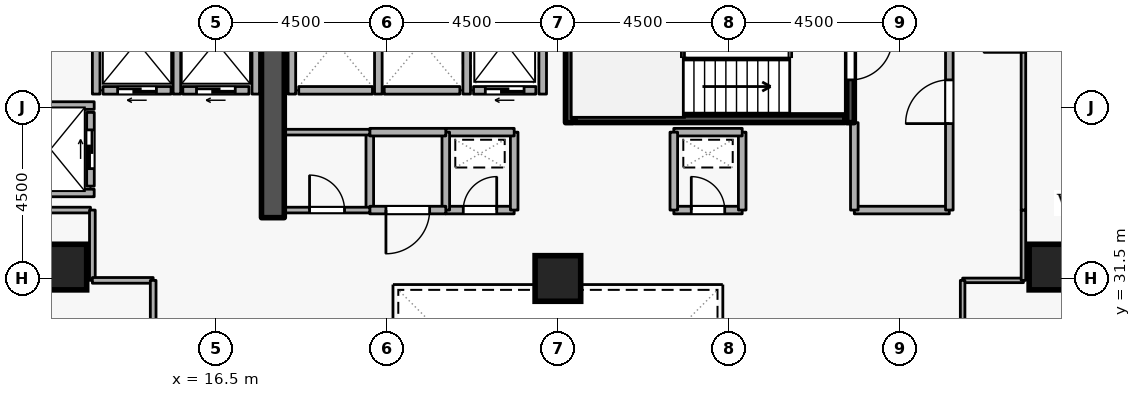
"""IFC4 building model, lengths in metres.
Left out: names, types, materials, properties, quantities, classifications, styles, units other than length and angle.
Written with IfcOpenShell. Run it as: python <this file> out.ifc"""

import sys

from ifc_helpers import new_model, si_unit, direction, frame, frame_2d, origin, origin_2d, place, context, subcontext, project, spatial, rectangle, extrude, element, fill, save


model = new_model("IFC4")
c1 = context("Model", 3, precision=1e-05, world=origin(), true_north=direction((0.0, 1.0)))
c2 = subcontext(c1, "Body", "Model", "MODEL_VIEW")
j1 = project(units=[si_unit("LENGTHUNIT", "METRE"), si_unit("PLANEANGLEUNIT", "RADIAN")], contexts=[c1])
p1 = place(None, origin())
s1 = spatial("IfcSite", under=j1, at=p1, CompositionType="ELEMENT")
p2 = place(p1, origin())
s2 = spatial("IfcBuilding", under=s1, at=p2, CompositionType="ELEMENT")
p3 = place(p2, frame((0.0, 0.0, 83.7)))
s3 = spatial("IfcBuildingStorey", under=s2, at=p3, CompositionType="ELEMENT", Elevation=83.7)
p4 = place(p3, frame((18.0, 33.1, 0.0), z_axis=(0.0, 0.0, 1.0), x_axis=(0.0, 1.0, 0.0)))
e1 = element("IfcWall", 1, at=p4, inside=s3, PredefinedType="SHEAR", context=c2, shape_type="SweptSolid", body=[
    extrude(rectangle(XDim=5.7, YDim=0.6, at=frame_2d((2.85, 0.0))), origin(), (0.0, 0.0, 1.0), 3.6),
])
for number, where, z_axis, x_axis in (
    (2, (12.5, 31.8, 0.0), (0.0, 0.0, 1.0), (1.0, 0.0, 0.0)),
    (3, (38.5, 31.8, 0.0), (0.0, 0.0, 1.0), (1.0, 0.0, 0.0)),
    (4, (25.5, 31.5, 0.0), (0.0, 0.0, 1.0), (1.0, 0.0, 0.0)),
):
    element("IfcColumn", number, at=place(p3, frame(where, z_axis=z_axis, x_axis=x_axis)), inside=s3, PredefinedType="COLUMN", context=c2, shape_type="SweptSolid", body=[
        extrude(rectangle(XDim=1.2, YDim=1.2, at=origin_2d()), origin(), (0.0, 0.0, 1.0), 3.6),
    ])
p5 = place(p3, frame((24.92, 36.45, 0.0), z_axis=(0.0, 0.0, 1.0), x_axis=(-1.0, 0.0, 0.0)))
e5 = element("IfcWall", 5, at=p5, inside=s3, PredefinedType="STANDARD", context=c2, shape_type="SweptSolid", body=[
    extrude(rectangle(XDim=1.64, YDim=0.2, at=frame_2d((0.82, 0.0))), origin(), (0.0, 0.0, 1.0), 3.34),
])
p6 = place(p5, frame((0.31, 0.0, 0.0)))
e6 = element("IfcOpeningElement", 6, at=p6, cuts=e5, PredefinedType="OPENING", context=c2, shape_type="SweptSolid", body=[
    extrude(rectangle(XDim=1.02, YDim=2.06, at=frame_2d((0.51, 1.03))), frame((0.0, 0.11, 0.0), z_axis=(0.0, -1.0, 0.0), x_axis=(1.0, 0.0, 0.0)), (0.0, 0.0, 1.0), 0.22),
])
p7 = place(p3, frame((22.92, 36.45, 0.0), z_axis=(0.0, 0.0, 1.0), x_axis=(-1.0, 0.0, 0.0)))
e7 = element("IfcWall", 7, at=p7, inside=s3, PredefinedType="STANDARD", context=c2, shape_type="SweptSolid", body=[
    extrude(rectangle(XDim=1.99, YDim=0.2, at=frame_2d((0.995, 0.0))), origin(), (0.0, 0.0, 1.0), 3.34),
])
p8 = place(p3, frame((20.62, 36.45, 0.0), z_axis=(0.0, 0.0, 1.0), x_axis=(-1.0, 0.0, 0.0)))
e8 = element("IfcWall", 8, at=p8, inside=s3, PredefinedType="STANDARD", context=c2, shape_type="SweptSolid", body=[
    extrude(rectangle(XDim=1.94, YDim=0.2, at=frame_2d((0.97, 0.0))), origin(), (0.0, 0.0, 1.0), 3.34),
])
p9 = place(p3, frame((17.37, 36.45, 0.0), z_axis=(0.0, 0.0, 1.0), x_axis=(-1.0, 0.0, 0.0)))
e9 = element("IfcWall", 9, at=p9, inside=s3, PredefinedType="STANDARD", context=c2, shape_type="SweptSolid", body=[
    extrude(rectangle(XDim=1.74, YDim=0.2, at=frame_2d((0.87, 0.0))), origin(), (0.0, 0.0, 1.0), 3.34),
])
p10 = place(p9, frame((0.36, 0.0, 0.0)))
e10 = element("IfcOpeningElement", 10, at=p10, cuts=e9, PredefinedType="OPENING", context=c2, shape_type="SweptSolid", body=[
    extrude(rectangle(XDim=1.02, YDim=2.06, at=frame_2d((0.51, 1.03))), frame((0.0, 0.11, 0.0), z_axis=(0.0, -1.0, 0.0), x_axis=(1.0, 0.0, 0.0)), (0.0, 0.0, 1.0), 0.22),
])
p11 = place(p3, frame((15.32, 36.45, 0.0), z_axis=(0.0, 0.0, 1.0), x_axis=(-1.0, 0.0, 0.0)))
e11 = element("IfcWall", 11, at=p11, inside=s3, PredefinedType="STANDARD", context=c2, shape_type="SweptSolid", body=[
    extrude(rectangle(XDim=1.79, YDim=0.2, at=frame_2d((0.895, 0.0))), origin(), (0.0, 0.0, 1.0), 3.34),
])
p12 = place(p11, frame((0.385, 0.0, 0.0)))
e12 = element("IfcOpeningElement", 12, at=p12, cuts=e11, PredefinedType="OPENING", context=c2, shape_type="SweptSolid", body=[
    extrude(rectangle(XDim=1.02, YDim=2.06, at=frame_2d((0.51, 1.03))), frame((0.0, 0.11, 0.0), z_axis=(0.0, -1.0, 0.0), x_axis=(1.0, 0.0, 0.0)), (0.0, 0.0, 1.0), 0.22),
])
p13 = place(p3, frame((13.2, 33.93, 0.0), z_axis=(0.0, 0.0, 1.0), x_axis=(0.0, 1.0, 0.0)))
e13 = element("IfcWall", 13, at=p13, inside=s3, PredefinedType="STANDARD", context=c2, shape_type="SweptSolid", body=[
    extrude(rectangle(XDim=1.94, YDim=0.2, at=frame_2d((0.97, 0.0))), origin(), (0.0, 0.0, 1.0), 3.34),
])
p14 = place(p13, frame((0.46, 0.0, 0.0)))
e14 = element("IfcOpeningElement", 14, at=p14, cuts=e13, PredefinedType="OPENING", context=c2, shape_type="SweptSolid", body=[
    extrude(rectangle(XDim=1.02, YDim=2.06, at=frame_2d((0.51, 1.03))), frame((0.0, 0.11, 0.0), z_axis=(0.0, -1.0, 0.0), x_axis=(1.0, 0.0, 0.0)), (0.0, 0.0, 1.0), 0.22),
])
for number, where, z_axis, x_axis in (
    (15, (25.1, 36.352, 0.0), (0.0, 0.0, 1.0), (0.0, 1.0, 0.0)),
    (16, (23.1, 36.352, 0.0), (0.0, 0.0, 1.0), (0.0, 1.0, 0.0)),
    (17, (20.775, 36.352, 0.0), (0.0, 0.0, 1.0), (0.0, 1.0, 0.0)),
    (18, (18.5, 36.352, 0.0), (0.0, 0.0, 1.0), (0.0, 1.0, 0.0)),
):
    element("IfcWall", number, at=place(p3, frame(where, z_axis=z_axis, x_axis=x_axis)), inside=s3, PredefinedType="STANDARD", context=c2, shape_type="SweptSolid", body=[
        extrude(rectangle(XDim=2.436, YDim=0.2, at=frame_2d((1.218, 0.0))), origin(), (0.0, 0.0, 1.0), 3.34),
    ])
p15 = place(p3, frame((17.55, 36.352, 0.0), z_axis=(0.0, 0.0, 1.0), x_axis=(0.0, 1.0, 0.0)))
e19 = element("IfcWall", 19, at=p15, inside=s3, PredefinedType="STANDARD", context=c2, shape_type="SweptSolid", body=[
    extrude(rectangle(XDim=2.636, YDim=0.2, at=frame_2d((1.318, 0.0))), origin(), (0.0, 0.0, 1.0), 2.545),
])
for number, where, z_axis, x_axis in (
    (20, (15.475, 36.352, 0.0), (0.0, 0.0, 1.0), (0.0, 1.0, 0.0)),
    (21, (13.35, 36.352, 0.0), (0.0, 0.0, 1.0), (0.0, 1.0, 0.0)),
):
    element("IfcWall", number, at=place(p3, frame(where, z_axis=z_axis, x_axis=x_axis)), inside=s3, PredefinedType="STANDARD", context=c2, shape_type="SweptSolid", body=[
        extrude(rectangle(XDim=2.636, YDim=0.2, at=frame_2d((1.318, 0.0))), origin(), (0.0, 0.0, 1.0), 3.34),
    ])
for number, where, z_axis, x_axis in (
    (22, (11.002, 36.05, 0.0), (0.0, 0.0, 1.0), (1.0, 0.0, 0.0)),
    (23, (11.002, 33.75, 0.0), (0.0, 0.0, 1.0), (1.0, 0.0, 0.0)),
):
    element("IfcWall", number, at=place(p3, frame(where, z_axis=z_axis, x_axis=x_axis)), inside=s3, PredefinedType="STANDARD", context=c2, shape_type="SweptSolid", body=[
        extrude(rectangle(XDim=2.296, YDim=0.2, at=frame_2d((1.148, 0.0))), origin(), (0.0, 0.0, 1.0), 3.34),
    ])
p16 = place(p3, frame((33.2, 38.95, 0.0), z_axis=(0.0, 0.0, 1.0), x_axis=(0.0, -1.0, 0.0)))
e24 = element("IfcWall", 24, at=p16, inside=s3, PredefinedType="SHEAR", context=c2, shape_type="SweptSolid", body=[
    extrude(rectangle(XDim=3.35, YDim=0.2, at=frame_2d((1.675, 0.0))), origin(), (0.0, 0.0, 1.0), 3.6),
])
p17 = place(p16, frame((1.125, 0.0, 0.0)))
e25 = element("IfcOpeningElement", 25, at=p17, cuts=e24, PredefinedType="OPENING", context=c2, shape_type="SweptSolid", body=[
    extrude(rectangle(XDim=1.1, YDim=2.1, at=frame_2d((0.55, 1.05))), frame((0.0, 0.11, 0.0), z_axis=(0.0, -1.0, 0.0), x_axis=(1.0, 0.0, 0.0)), (0.0, 0.0, 1.0), 0.22),
])
p18 = place(p3, frame((25.8, 35.6, 0.0), z_axis=(0.0, 0.0, 1.0), x_axis=(0.0, 1.0, 0.0)))
e26 = element("IfcWall", 26, at=p18, inside=s3, PredefinedType="SHEAR", context=c2, shape_type="SweptSolid", body=[
    extrude(rectangle(XDim=3.35, YDim=0.2, at=frame_2d((1.675, 0.0))), origin(), (0.0, 0.0, 1.0), 3.6),
])
p19 = place(p3, frame((25.95, 35.703, 0.0), z_axis=(0.0, 0.0, 1.0), x_axis=(1.0, 0.0, 0.0)))
e27 = element("IfcWall", 27, at=p19, inside=s3, PredefinedType="SHEAR", context=c2, shape_type="SweptSolid", body=[
    extrude(rectangle(XDim=7.1, YDim=0.2, at=frame_2d((3.55, 0.0))), origin(), (0.0, 0.0, 1.0), 3.6),
])
p20 = place(p3, frame((33.3, 33.3, 0.0), z_axis=(0.0, 0.0, 1.0), x_axis=(1.0, 0.0, 0.0)))
e28 = element("IfcWall", 28, at=p20, inside=s3, PredefinedType="STANDARD", context=c2, shape_type="SweptSolid", body=[
    extrude(rectangle(XDim=2.5, YDim=0.2, at=frame_2d((1.25, 0.0))), origin(), (0.0, 0.0, 1.0), 3.34),
])
p21 = place(p3, frame((35.8, 33.3, 0.0), z_axis=(0.0, 0.0, 1.0), x_axis=(0.0, 1.0, 0.0)))
e29 = element("IfcWall", 29, at=p21, inside=s3, PredefinedType="STANDARD", context=c2, shape_type="SweptSolid", body=[
    extrude(rectangle(XDim=5.7, YDim=0.2, at=frame_2d((2.85, 0.0))), origin(), (0.0, 0.0, 1.0), 3.34),
])
p22 = place(p21, frame((2.275, 0.0, 0.0)))
e30 = element("IfcOpeningElement", 30, at=p22, cuts=e29, PredefinedType="OPENING", context=c2, shape_type="SweptSolid", body=[
    extrude(rectangle(XDim=1.15, YDim=2.1, at=frame_2d((0.575, 1.05))), frame((0.0, 0.11, 0.0), z_axis=(0.0, -1.0, 0.0), x_axis=(1.0, 0.0, 0.0)), (0.0, 0.0, 1.0), 0.22),
])
p23 = place(p3, frame((33.3, 35.6, 0.0), z_axis=(0.0, 0.0, 1.0), x_axis=(0.0, -1.0, 0.0)))
e31 = element("IfcWall", 31, at=p23, inside=s3, PredefinedType="STANDARD", context=c2, shape_type="SweptSolid", body=[
    extrude(rectangle(XDim=2.3, YDim=0.2, at=frame_2d((1.15, 0.0))), origin(), (0.0, 0.0, 1.0), 2.545),
])
p24 = place(p3, frame((22.55, 33.3, 0.0), z_axis=(0.0, 0.0, 1.0), x_axis=(1.0, 0.0, 0.0)))
e32 = element("IfcWall", 32, at=p24, inside=s3, PredefinedType="STANDARD", context=c2, shape_type="SweptSolid", body=[
    extrude(rectangle(XDim=1.8, YDim=0.2, at=frame_2d((0.9, 0.0))), origin(), (0.0, 0.0, 1.0), 3.34),
])
p25 = place(p24, frame((0.46, 0.0, 0.0)))
e33 = element("IfcOpeningElement", 33, at=p25, cuts=e32, PredefinedType="OPENING", context=c2, shape_type="SweptSolid", body=[
    extrude(rectangle(XDim=0.88, YDim=2.04, at=frame_2d((0.44, 1.02))), frame((0.0, 0.11, 0.0), z_axis=(0.0, -1.0, 0.0), x_axis=(1.0, 0.0, 0.0)), (0.0, 0.0, 1.0), 0.22),
])
p26 = place(p3, frame((24.35, 33.3, 0.0), z_axis=(0.0, 0.0, 1.0), x_axis=(0.0, 1.0, 0.0)))
e34 = element("IfcWall", 34, at=p26, inside=s3, PredefinedType="STANDARD", context=c2, shape_type="SweptSolid", body=[
    extrude(rectangle(XDim=2.05, YDim=0.2, at=frame_2d((1.025, 0.0))), origin(), (0.0, 0.0, 1.0), 3.34),
])
p27 = place(p3, frame((24.35, 35.35, 0.0), z_axis=(0.0, 0.0, 1.0), x_axis=(-1.0, 0.0, 0.0)))
e35 = element("IfcWall", 35, at=p27, inside=s3, PredefinedType="STANDARD", context=c2, shape_type="SweptSolid", body=[
    extrude(rectangle(XDim=1.8, YDim=0.2, at=frame_2d((0.9, 0.0))), origin(), (0.0, 0.0, 1.0), 3.34),
])
p28 = place(p3, frame((22.55, 35.35, 0.0), z_axis=(0.0, 0.0, 1.0), x_axis=(0.0, -1.0, 0.0)))
e36 = element("IfcWall", 36, at=p28, inside=s3, PredefinedType="STANDARD", context=c2, shape_type="SweptSolid", body=[
    extrude(rectangle(XDim=2.05, YDim=0.2, at=frame_2d((1.025, 0.0))), origin(), (0.0, 0.0, 1.0), 3.34),
])
p29 = place(p3, frame((28.55, 33.3, 0.0), z_axis=(0.0, 0.0, 1.0), x_axis=(1.0, 0.0, 0.0)))
e37 = element("IfcWall", 37, at=p29, inside=s3, PredefinedType="STANDARD", context=c2, shape_type="SweptSolid", body=[
    extrude(rectangle(XDim=1.8, YDim=0.2, at=frame_2d((0.9, 0.0))), origin(), (0.0, 0.0, 1.0), 3.34),
])
p30 = place(p29, frame((0.46, 0.0, 0.0)))
e38 = element("IfcOpeningElement", 38, at=p30, cuts=e37, PredefinedType="OPENING", context=c2, shape_type="SweptSolid", body=[
    extrude(rectangle(XDim=0.88, YDim=2.04, at=frame_2d((0.44, 1.02))), frame((0.0, 0.11, 0.0), z_axis=(0.0, -1.0, 0.0), x_axis=(1.0, 0.0, 0.0)), (0.0, 0.0, 1.0), 0.22),
])
p31 = place(p3, frame((30.35, 33.3, 0.0), z_axis=(0.0, 0.0, 1.0), x_axis=(0.0, 1.0, 0.0)))
e39 = element("IfcWall", 39, at=p31, inside=s3, PredefinedType="STANDARD", context=c2, shape_type="SweptSolid", body=[
    extrude(rectangle(XDim=2.05, YDim=0.2, at=frame_2d((1.025, 0.0))), origin(), (0.0, 0.0, 1.0), 3.34),
])
p32 = place(p3, frame((30.35, 35.35, 0.0), z_axis=(0.0, 0.0, 1.0), x_axis=(-1.0, 0.0, 0.0)))
e40 = element("IfcWall", 40, at=p32, inside=s3, PredefinedType="STANDARD", context=c2, shape_type="SweptSolid", body=[
    extrude(rectangle(XDim=1.8, YDim=0.2, at=frame_2d((0.9, 0.0))), origin(), (0.0, 0.0, 1.0), 3.34),
])
for number, where, z_axis, x_axis in (
    (41, (28.55, 35.35, 0.0), (0.0, 0.0, 1.0), (0.0, -1.0, 0.0)),
    (42, (20.55, 33.3, 0.0), (0.0, 0.0, 1.0), (0.0, 1.0, 0.0)),
):
    element("IfcWall", number, at=place(p3, frame(where, z_axis=z_axis, x_axis=x_axis)), inside=s3, PredefinedType="STANDARD", context=c2, shape_type="SweptSolid", body=[
        extrude(rectangle(XDim=2.05, YDim=0.2, at=frame_2d((1.025, 0.0))), origin(), (0.0, 0.0, 1.0), 3.34),
    ])
p33 = place(p3, frame((20.55, 35.35, 0.0), z_axis=(0.0, 0.0, 1.0), x_axis=(1.0, 0.0, 0.0)))
e43 = element("IfcWall", 43, at=p33, inside=s3, PredefinedType="STANDARD", context=c2, shape_type="SweptSolid", body=[
    extrude(rectangle(XDim=2.0, YDim=0.2, at=frame_2d((1.0, 0.0))), origin(), (0.0, 0.0, 1.0), 3.34),
])
p34 = place(p3, frame((22.55, 33.3, 0.0), z_axis=(0.0, 0.0, 1.0), x_axis=(-1.0, 0.0, 0.0)))
e44 = element("IfcWall", 44, at=p34, inside=s3, PredefinedType="STANDARD", context=c2, shape_type="SweptSolid", body=[
    extrude(rectangle(XDim=2.0, YDim=0.2, at=frame_2d((1.0, 0.0))), origin(), (0.0, 0.0, 1.0), 3.34),
])
p35 = place(p34, frame((0.425, 0.0, 0.0)))
e45 = element("IfcOpeningElement", 45, at=p35, cuts=e44, PredefinedType="OPENING", context=c2, shape_type="SweptSolid", body=[
    extrude(rectangle(XDim=1.15, YDim=2.1, at=frame_2d((0.575, 1.05))), frame((0.0, 0.11, 0.0), z_axis=(0.0, -1.0, 0.0), x_axis=(1.0, 0.0, 0.0)), (0.0, 0.0, 1.0), 0.22),
])
p36 = place(p3, frame((18.3, 33.3, 0.0), z_axis=(0.0, 0.0, 1.0), x_axis=(1.0, 0.0, 0.0)))
e46 = element("IfcWall", 46, at=p36, inside=s3, PredefinedType="PARTITIONING", context=c2, shape_type="SweptSolid", body=[
    extrude(rectangle(XDim=2.25, YDim=0.15, at=frame_2d((1.125, 0.0))), origin(), (0.0, 0.0, 1.0), 3.34),
])
p37 = place(p36, frame((0.665, 0.0, 0.0)))
e47 = element("IfcOpeningElement", 47, at=p37, cuts=e46, PredefinedType="OPENING", context=c2, shape_type="SweptSolid", body=[
    extrude(rectangle(XDim=0.92, YDim=2.08, at=frame_2d((0.46, 1.04))), frame((0.0, 0.085, 0.0), z_axis=(0.0, -1.0, 0.0), x_axis=(1.0, 0.0, 0.0)), (0.0, 0.0, 1.0), 0.17),
])
p38 = place(p3, frame((20.55, 35.35, 0.0), z_axis=(0.0, 0.0, 1.0), x_axis=(-1.0, 0.0, 0.0)))
e48 = element("IfcWall", 48, at=p38, inside=s3, PredefinedType="PARTITIONING", context=c2, shape_type="SweptSolid", body=[
    extrude(rectangle(XDim=2.25, YDim=0.15, at=frame_2d((1.125, 0.0))), origin(), (0.0, 0.0, 1.0), 3.34),
])
p39 = place(p3, frame((10.9, 33.3, 0.0), z_axis=(0.0, 0.0, 1.0), x_axis=(1.0, 0.0, 0.0)))
e49 = element("IfcWall", 49, at=p39, inside=s3, PredefinedType="PARTITIONING", context=c2, shape_type="SweptSolid", body=[
    extrude(rectangle(XDim=2.3, YDim=0.15, at=frame_2d((1.15, 0.0))), origin(), (0.0, 0.0, 1.0), 3.34),
])
p40 = place(p3, frame((13.25, 33.3, 0.0), z_axis=(0.0, 0.0, 1.0), x_axis=(0.0, -1.0, 0.0)))
e50 = element("IfcWall", 50, at=p40, inside=s3, PredefinedType="PARTITIONING", context=c2, shape_type="SweptSolid", body=[
    extrude(rectangle(XDim=1.85, YDim=0.15, at=frame_2d((0.925, 0.0))), origin(), (0.0, 0.0, 1.0), 3.34),
])
p41 = place(p3, frame((13.25, 31.45, 0.0), z_axis=(0.0, 0.0, 1.0), x_axis=(1.0, 0.0, 0.0)))
e51 = element("IfcWall", 51, at=p41, inside=s3, PredefinedType="PARTITIONING", context=c2, shape_type="SweptSolid", body=[
    extrude(rectangle(XDim=1.6, YDim=0.15, at=frame_2d((0.8, 0.0))), origin(), (0.0, 0.0, 1.0), 3.34),
])
p42 = place(p3, frame((14.85, 31.45, 0.0), z_axis=(0.0, 0.0, 1.0), x_axis=(0.0, -1.0, 0.0)))
e52 = element("IfcWall", 52, at=p42, inside=s3, PredefinedType="PARTITIONING", context=c2, shape_type="SweptSolid", body=[
    extrude(rectangle(XDim=4.45, YDim=0.15, at=frame_2d((2.225, 0.0))), origin(), (0.0, 0.0, 1.0), 3.34),
])
p43 = place(p42, frame((1.575, 0.0, 0.0)))
e53 = element("IfcOpeningElement", 53, at=p43, cuts=e52, PredefinedType="OPENING", context=c2, shape_type="SweptSolid", body=[
    extrude(rectangle(XDim=1.3, YDim=2.12, at=frame_2d((0.65, 1.06))), frame((0.0, 0.085, 0.0), z_axis=(0.0, -1.0, 0.0), x_axis=(1.0, 0.0, 0.0)), (0.0, 0.0, 1.0), 0.17),
])
p44 = place(p3, frame((36.15, 31.45, 0.0), z_axis=(0.0, 0.0, 1.0), x_axis=(1.0, 0.0, 0.0)))
e54 = element("IfcWall", 54, at=p44, inside=s3, PredefinedType="PARTITIONING", context=c2, shape_type="SweptSolid", body=[
    extrude(rectangle(XDim=1.6, YDim=0.12, at=frame_2d((0.8, 0.0))), origin(), (0.0, 0.0, 1.0), 3.34),
])
p45 = place(p3, frame((37.75, 31.45, 0.0), z_axis=(0.0, 0.0, 1.0), x_axis=(0.0, 1.0, 0.0)))
e55 = element("IfcWall", 55, at=p45, inside=s3, PredefinedType="PARTITIONING", context=c2, shape_type="SweptSolid", body=[
    extrude(rectangle(XDim=1.85, YDim=0.12, at=frame_2d((0.925, 0.0))), origin(), (0.0, 0.0, 1.0), 3.34),
])
p46 = place(p3, frame((37.75, 33.3, 0.0), z_axis=(0.0, 0.0, 1.0), x_axis=(0.0, 1.0, 0.0)))
e56 = element("IfcWall", 56, at=p46, inside=s3, PredefinedType="PARTITIONING", context=c2, shape_type="SweptSolid", body=[
    extrude(rectangle(XDim=9.35, YDim=0.12, at=frame_2d((4.675, 0.0))), origin(), (0.0, 0.0, 1.0), 3.34),
])
p47 = place(p46, frame((4.15, 0.0, 0.0)))
e57 = element("IfcOpeningElement", 57, at=p47, cuts=e56, PredefinedType="OPENING", context=c2, shape_type="SweptSolid", body=[
    extrude(rectangle(XDim=1.05, YDim=2.1, at=frame_2d((0.525, 1.05))), frame((0.0, 0.07, 0.0), z_axis=(0.0, -1.0, 0.0), x_axis=(1.0, 0.0, 0.0)), (0.0, 0.0, 1.0), 0.14),
])
p48 = place(p3, frame((36.15, 27.0, 0.0), z_axis=(0.0, 0.0, 1.0), x_axis=(0.0, 1.0, 0.0)))
e58 = element("IfcWall", 58, at=p48, inside=s3, PredefinedType="PARTITIONING", context=c2, shape_type="SweptSolid", body=[
    extrude(rectangle(XDim=4.45, YDim=0.12, at=frame_2d((2.225, 0.0))), origin(), (0.0, 0.0, 1.0), 3.34),
])
p49 = place(p6, origin())
e59 = element("IfcDoor", 59, at=p49, inside=s3, OperationType="SLIDING_TO_LEFT", PredefinedType="DOOR", context=c2, shape_type="SweptSolid", body=[
    extrude(rectangle(XDim=1.02, YDim=2.06, at=frame_2d((0.51, 1.03))), frame((0.0, 0.025, 0.0), z_axis=(0.0, -1.0, 0.0), x_axis=(1.0, 0.0, 0.0)), (0.0, 0.0, 1.0), 0.05),
])
fill(e6, e59)
p50 = place(p10, origin())
e60 = element("IfcDoor", 60, at=p50, inside=s3, OperationType="SLIDING_TO_LEFT", PredefinedType="DOOR", context=c2, shape_type="SweptSolid", body=[
    extrude(rectangle(XDim=1.02, YDim=2.06, at=frame_2d((0.51, 1.03))), frame((0.0, 0.025, 0.0), z_axis=(0.0, -1.0, 0.0), x_axis=(1.0, 0.0, 0.0)), (0.0, 0.0, 1.0), 0.05),
])
fill(e10, e60)
p51 = place(p12, origin())
e61 = element("IfcDoor", 61, at=p51, inside=s3, OperationType="SLIDING_TO_LEFT", PredefinedType="DOOR", context=c2, shape_type="SweptSolid", body=[
    extrude(rectangle(XDim=1.02, YDim=2.06, at=frame_2d((0.51, 1.03))), frame((0.0, 0.025, 0.0), z_axis=(0.0, -1.0, 0.0), x_axis=(1.0, 0.0, 0.0)), (0.0, 0.0, 1.0), 0.05),
])
fill(e12, e61)
p52 = place(p14, origin())
e62 = element("IfcDoor", 62, at=p52, inside=s3, OperationType="SLIDING_TO_LEFT", PredefinedType="DOOR", context=c2, shape_type="SweptSolid", body=[
    extrude(rectangle(XDim=1.02, YDim=2.06, at=frame_2d((0.51, 1.03))), frame((0.0, 0.025, 0.0), z_axis=(0.0, -1.0, 0.0), x_axis=(1.0, 0.0, 0.0)), (0.0, 0.0, 1.0), 0.05),
])
fill(e14, e62)
p53 = place(p17, origin())
e63 = element("IfcDoor", 63, at=p53, inside=s3, OperationType="SINGLE_SWING_LEFT", PredefinedType="DOOR", context=c2, shape_type="SweptSolid", body=[
    extrude(rectangle(XDim=1.1, YDim=2.1, at=frame_2d((0.55, 1.05))), frame((0.0, 0.025, 0.0), z_axis=(0.0, -1.0, 0.0), x_axis=(1.0, 0.0, 0.0)), (0.0, 0.0, 1.0), 0.05),
])
fill(e25, e63)
p54 = place(p22, origin())
e64 = element("IfcDoor", 64, at=p54, inside=s3, OperationType="SINGLE_SWING_LEFT", PredefinedType="DOOR", context=c2, shape_type="SweptSolid", body=[
    extrude(rectangle(XDim=1.15, YDim=2.1, at=frame_2d((0.575, 1.05))), frame((0.0, 0.025, 0.0), z_axis=(0.0, -1.0, 0.0), x_axis=(1.0, 0.0, 0.0)), (0.0, 0.0, 1.0), 0.05),
])
fill(e30, e64)
p55 = place(p25, origin())
e65 = element("IfcDoor", 65, at=p55, inside=s3, OperationType="SINGLE_SWING_RIGHT", PredefinedType="DOOR", context=c2, shape_type="SweptSolid", body=[
    extrude(rectangle(XDim=0.88, YDim=2.04, at=frame_2d((0.44, 1.02))), frame((0.0, 0.025, 0.0), z_axis=(0.0, -1.0, 0.0), x_axis=(1.0, 0.0, 0.0)), (0.0, 0.0, 1.0), 0.05),
])
fill(e33, e65)
p56 = place(p30, origin())
e66 = element("IfcDoor", 66, at=p56, inside=s3, OperationType="SINGLE_SWING_LEFT", PredefinedType="DOOR", context=c2, shape_type="SweptSolid", body=[
    extrude(rectangle(XDim=0.88, YDim=2.04, at=frame_2d((0.44, 1.02))), frame((0.0, 0.025, 0.0), z_axis=(0.0, -1.0, 0.0), x_axis=(1.0, 0.0, 0.0)), (0.0, 0.0, 1.0), 0.05),
])
fill(e38, e66)
p57 = place(p37, origin())
e67 = element("IfcDoor", 67, at=p57, inside=s3, OperationType="SINGLE_SWING_LEFT", PredefinedType="DOOR", context=c2, shape_type="SweptSolid", body=[
    extrude(rectangle(XDim=0.92, YDim=2.08, at=frame_2d((0.46, 1.04))), frame((0.0, 0.025, 0.0), z_axis=(0.0, -1.0, 0.0), x_axis=(1.0, 0.0, 0.0)), (0.0, 0.0, 1.0), 0.05),
])
fill(e47, e67)
p58 = place(p35, origin())
e68 = element("IfcDoor", 68, at=p58, inside=s3, OperationType="SINGLE_SWING_RIGHT", PredefinedType="DOOR", context=c2, shape_type="SweptSolid", body=[
    extrude(rectangle(XDim=1.15, YDim=2.1, at=frame_2d((0.575, 1.05))), frame((0.0, 0.025, 0.0), z_axis=(0.0, -1.0, 0.0), x_axis=(1.0, 0.0, 0.0)), (0.0, 0.0, 1.0), 0.05),
])
fill(e45, e68)
p59 = place(p47, origin())
e69 = element("IfcDoor", 69, at=p59, inside=s3, OperationType="SINGLE_SWING_LEFT", PredefinedType="DOOR", context=c2, shape_type="SweptSolid", body=[
    extrude(rectangle(XDim=1.05, YDim=2.1, at=frame_2d((0.525, 1.05))), frame((0.0, 0.025, 0.0), z_axis=(0.0, -1.0, 0.0), x_axis=(1.0, 0.0, 0.0)), (0.0, 0.0, 1.0), 0.05),
])
fill(e57, e69)
save(model, sys.argv[1])
